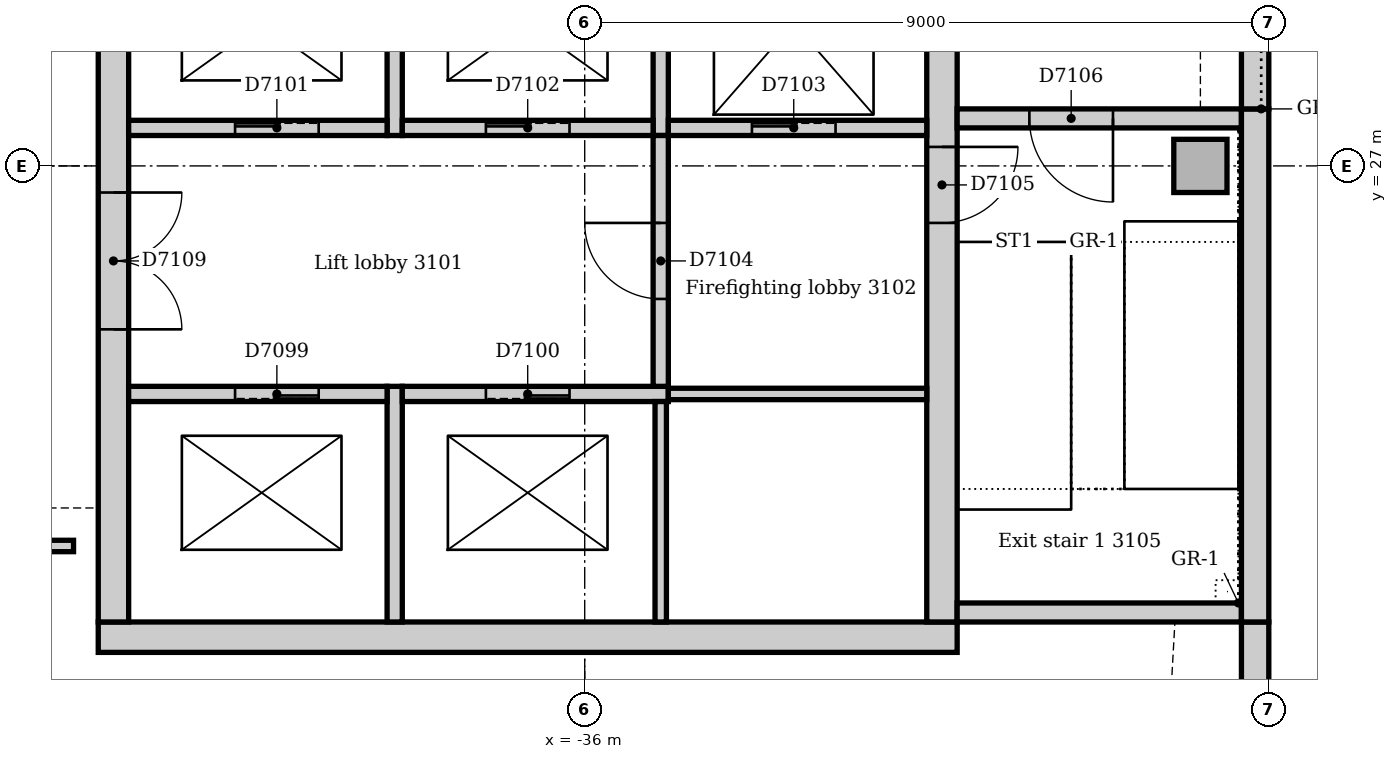
"""IFC4 building model, lengths in metres.
Left out: names, types, materials, properties, quantities, classifications, styles, units other than length and angle.
Written with IfcOpenShell. Run it as: python <this file> out.ifc"""

import sys

from ifc_helpers import new_model, si_unit, direction, frame, frame_2d, origin, origin_2d, place, context, subcontext, project, spatial, rectangle, extrude, element, fill, save


model = new_model("IFC4")
c1 = context("Model", 3, precision=1e-05, world=origin(), true_north=direction((0.0, 1.0)))
c2 = subcontext(c1, "Body", "Model", "MODEL_VIEW")
j1 = project(units=[si_unit("LENGTHUNIT", "METRE"), si_unit("PLANEANGLEUNIT", "RADIAN")], contexts=[c1])
p1 = place(None, origin())
s1 = spatial("IfcSite", under=j1, at=p1, CompositionType="ELEMENT")
p2 = place(p1, origin())
s2 = spatial("IfcBuilding", under=s1, at=p2, CompositionType="ELEMENT")
p3 = place(p2, frame((0.0, 0.0, 132.0)))
s3 = spatial("IfcBuildingStorey", under=s2, at=p3, CompositionType="ELEMENT", Elevation=132.0)
p4 = place(p3, frame((-42.4, 20.8, 0.0), z_axis=(0.0, 0.0, 1.0), x_axis=(1.0, 0.0, 0.0)))
e1 = element("IfcWall", 1, at=p4, inside=s3, PredefinedType="SOLIDWALL", context=c2, shape_type="SweptSolid", body=[
    extrude(rectangle(XDim=11.3, YDim=0.4, at=frame_2d((5.65, 0.0))), origin(), (0.0, 0.0, 1.0), 4.0),
])
p5 = place(p3, frame((-31.3, 21.0, 0.0), z_axis=(0.0, 0.0, 1.0), x_axis=(0.0, 1.0, 0.0)))
e2 = element("IfcWall", 2, at=p5, inside=s3, PredefinedType="SOLIDWALL", context=c2, shape_type="SweptSolid", body=[
    extrude(rectangle(XDim=9.5, YDim=0.4, at=frame_2d((4.75, 0.0))), origin(), (0.0, 0.0, 1.0), 4.0),
])
p6 = place(p5, frame((5.25, 0.0, 0.0)))
e3 = element("IfcOpeningElement", 3, at=p6, cuts=e2, PredefinedType="OPENING", context=c2, shape_type="SweptSolid", body=[
    extrude(rectangle(XDim=1.0, YDim=2.1, at=frame_2d((0.5, 1.05))), frame((0.0, 0.21, 0.0), z_axis=(0.0, -1.0, 0.0), x_axis=(1.0, 0.0, 0.0)), (0.0, 0.0, 1.0), 0.42),
])
p7 = place(p3, frame((-42.2, 30.5, 0.0), z_axis=(0.0, 0.0, 1.0), x_axis=(0.0, -1.0, 0.0)))
e4 = element("IfcWall", 4, at=p7, inside=s3, PredefinedType="SOLIDWALL", context=c2, shape_type="SweptSolid", body=[
    extrude(rectangle(XDim=9.5, YDim=0.4, at=frame_2d((4.75, 0.0))), origin(), (0.0, 0.0, 1.0), 4.0),
])
p8 = place(p7, frame((3.85, 0.0, 0.0)))
e5 = element("IfcOpeningElement", 5, at=p8, cuts=e4, PredefinedType="OPENING", context=c2, shape_type="SweptSolid", body=[
    extrude(rectangle(XDim=1.8, YDim=2.1, at=frame_2d((0.9, 1.05))), frame((0.0, 0.21, 0.0), z_axis=(0.0, -1.0, 0.0), x_axis=(1.0, 0.0, 0.0)), (0.0, 0.0, 1.0), 0.42),
])
p9 = place(p3, frame((-31.1, 21.125, 0.0), z_axis=(0.0, 0.0, 1.0), x_axis=(1.0, 0.0, 0.0)))
e6 = element("IfcWall", 6, at=p9, inside=s3, PredefinedType="SOLIDWALL", context=c2, shape_type="SweptSolid", body=[
    extrude(rectangle(XDim=3.74, YDim=0.25, at=frame_2d((1.87, 0.0))), origin(), (0.0, 0.0, 1.0), 4.0),
])
p10 = place(p3, frame((-27.36, 27.625, 0.0), z_axis=(0.0, 0.0, 1.0), x_axis=(-1.0, 0.0, 0.0)))
e7 = element("IfcWall", 7, at=p10, inside=s3, PredefinedType="SOLIDWALL", context=c2, shape_type="SweptSolid", body=[
    extrude(rectangle(XDim=3.74, YDim=0.25, at=frame_2d((1.87, 0.0))), origin(), (0.0, 0.0, 1.0), 4.0),
])
p11 = place(p10, frame((1.69, 0.0, 0.0)))
e8 = element("IfcOpeningElement", 8, at=p11, cuts=e7, PredefinedType="OPENING", context=c2, shape_type="SweptSolid", body=[
    extrude(rectangle(XDim=1.1, YDim=2.1, at=frame_2d((0.55, 1.05))), frame((0.0, 0.135, 0.0), z_axis=(0.0, -1.0, 0.0), x_axis=(1.0, 0.0, 0.0)), (0.0, 0.0, 1.0), 0.27),
])
p12 = place(p3, frame((-27.9, 27.0, 0.0), z_axis=(0.0, 0.0, 1.0), x_axis=(1.0, 0.0, 0.0)))
e9 = element("IfcColumn", 9, at=p12, inside=s3, PredefinedType="COLUMN", context=c2, shape_type="SweptSolid", body=[
    extrude(rectangle(XDim=0.7, YDim=0.7, at=origin_2d()), origin(), (0.0, 0.0, 1.0), 4.0),
])
p13 = place(p3, frame((-27.18, 17.743, 0.0), z_axis=(0.0, 0.0, 1.0), x_axis=(0.0, 1.0, 0.0)))
e10 = element("IfcWall", 10, at=p13, inside=s3, PredefinedType="STANDARD", context=c2, shape_type="SweptSolid", body=[
    extrude(rectangle(XDim=3.257, YDim=0.36, at=frame_2d((1.629, 0.0))), origin(), (0.0, 0.0, 1.0), 3.85),
])
p14 = place(p3, frame((-27.18, 21.0, 0.0), z_axis=(0.0, 0.0, 1.0), x_axis=(0.0, 1.0, 0.0)))
e11 = element("IfcWall", 11, at=p14, inside=s3, PredefinedType="STANDARD", context=c2, shape_type="SweptSolid", body=[
    extrude(rectangle(XDim=6.75, YDim=0.36, at=frame_2d((3.375, 0.0))), origin(), (0.0, 0.0, 1.0), 3.85),
])
p15 = place(p3, frame((-27.18, 27.75, 0.0), z_axis=(0.0, 0.0, 1.0), x_axis=(0.0, 1.0, 0.0)))
e12 = element("IfcWall", 12, at=p15, inside=s3, PredefinedType="STANDARD", context=c2, shape_type="SweptSolid", body=[
    extrude(rectangle(XDim=7.5, YDim=0.36, at=frame_2d((3.75, 0.0))), origin(), (0.0, 0.0, 1.0), 3.85),
])
p16 = place(p15, frame((2.85, 0.0, 1.2)))
e13 = element("IfcOpeningElement", 13, at=p16, cuts=e12, PredefinedType="OPENING", context=c2, shape_type="SweptSolid", body=[
    extrude(rectangle(XDim=1.8, YDim=1.2, at=frame_2d((0.9, 0.6))), frame((0.0, 0.19, 0.0), z_axis=(0.0, -1.0, 0.0), x_axis=(1.0, 0.0, 0.0)), (0.0, 0.0, 1.0), 0.38),
])
p17 = place(p3, frame((-38.5, 21.0, 0.0), z_axis=(0.0, 0.0, 1.0), x_axis=(0.0, 1.0, 0.0)))
e14 = element("IfcWall", 14, at=p17, inside=s3, PredefinedType="SOLIDWALL", context=c2, shape_type="SweptSolid", body=[
    extrude(rectangle(XDim=3.1, YDim=0.2, at=frame_2d((1.55, 0.0))), origin(), (0.0, 0.0, 1.0), 4.0),
])
p18 = place(p3, frame((-38.6, 24.0, 0.0), z_axis=(0.0, 0.0, 1.0), x_axis=(-1.0, 0.0, 0.0)))
e15 = element("IfcWall", 15, at=p18, inside=s3, PredefinedType="SOLIDWALL", context=c2, shape_type="SweptSolid", body=[
    extrude(rectangle(XDim=3.4, YDim=0.2, at=frame_2d((1.7, 0.0))), origin(), (0.0, 0.0, 1.0), 4.0),
])
p19 = place(p18, frame((0.9, 0.0, 0.0)))
e16 = element("IfcOpeningElement", 16, at=p19, cuts=e15, PredefinedType="OPENING", context=c2, shape_type="SweptSolid", body=[
    extrude(rectangle(XDim=1.1, YDim=2.1, at=frame_2d((0.55, 1.05))), frame((0.0, 0.11, 0.0), z_axis=(0.0, -1.0, 0.0), x_axis=(1.0, 0.0, 0.0)), (0.0, 0.0, 1.0), 0.22),
])
p20 = place(p3, frame((-34.9, 24.0, 0.0), z_axis=(0.0, 0.0, 1.0), x_axis=(-1.0, 0.0, 0.0)))
e17 = element("IfcWall", 17, at=p20, inside=s3, PredefinedType="SOLIDWALL", context=c2, shape_type="SweptSolid", body=[
    extrude(rectangle(XDim=3.5, YDim=0.2, at=frame_2d((1.75, 0.0))), origin(), (0.0, 0.0, 1.0), 4.0),
])
p21 = place(p20, frame((1.3, 0.0, 0.0)))
e18 = element("IfcOpeningElement", 18, at=p21, cuts=e17, PredefinedType="OPENING", context=c2, shape_type="SweptSolid", body=[
    extrude(rectangle(XDim=1.1, YDim=2.1, at=frame_2d((0.55, 1.05))), frame((0.0, 0.11, 0.0), z_axis=(0.0, -1.0, 0.0), x_axis=(1.0, 0.0, 0.0)), (0.0, 0.0, 1.0), 0.22),
])
p22 = place(p3, frame((-38.5, 27.4, 0.0), z_axis=(0.0, 0.0, 1.0), x_axis=(0.0, 1.0, 0.0)))
e19 = element("IfcWall", 19, at=p22, inside=s3, PredefinedType="SOLIDWALL", context=c2, shape_type="SweptSolid", body=[
    extrude(rectangle(XDim=2.85, YDim=0.2, at=frame_2d((1.425, 0.0))), origin(), (0.0, 0.0, 1.0), 4.0),
])
p23 = place(p3, frame((-42.0, 27.5, 0.0), z_axis=(0.0, 0.0, 1.0), x_axis=(1.0, 0.0, 0.0)))
e20 = element("IfcWall", 20, at=p23, inside=s3, PredefinedType="SOLIDWALL", context=c2, shape_type="SweptSolid", body=[
    extrude(rectangle(XDim=3.4, YDim=0.2, at=frame_2d((1.7, 0.0))), origin(), (0.0, 0.0, 1.0), 4.0),
])
p24 = place(p23, frame((1.4, 0.0, 0.0)))
e21 = element("IfcOpeningElement", 21, at=p24, cuts=e20, PredefinedType="OPENING", context=c2, shape_type="SweptSolid", body=[
    extrude(rectangle(XDim=1.1, YDim=2.1, at=frame_2d((0.55, 1.05))), frame((0.0, 0.11, 0.0), z_axis=(0.0, -1.0, 0.0), x_axis=(1.0, 0.0, 0.0)), (0.0, 0.0, 1.0), 0.22),
])
p25 = place(p3, frame((-35.0, 27.4, 0.0), z_axis=(0.0, 0.0, 1.0), x_axis=(0.0, 1.0, 0.0)))
e22 = element("IfcWall", 22, at=p25, inside=s3, PredefinedType="SOLIDWALL", context=c2, shape_type="SweptSolid", body=[
    extrude(rectangle(XDim=2.85, YDim=0.2, at=frame_2d((1.425, 0.0))), origin(), (0.0, 0.0, 1.0), 4.0),
])
p26 = place(p3, frame((-38.4, 27.5, 0.0), z_axis=(0.0, 0.0, 1.0), x_axis=(1.0, 0.0, 0.0)))
e23 = element("IfcWall", 23, at=p26, inside=s3, PredefinedType="SOLIDWALL", context=c2, shape_type="SweptSolid", body=[
    extrude(rectangle(XDim=3.3, YDim=0.2, at=frame_2d((1.65, 0.0))), origin(), (0.0, 0.0, 1.0), 4.0),
])
p27 = place(p26, frame((1.1, 0.0, 0.0)))
e24 = element("IfcOpeningElement", 24, at=p27, cuts=e23, PredefinedType="OPENING", context=c2, shape_type="SweptSolid", body=[
    extrude(rectangle(XDim=1.1, YDim=2.1, at=frame_2d((0.55, 1.05))), frame((0.0, 0.11, 0.0), z_axis=(0.0, -1.0, 0.0), x_axis=(1.0, 0.0, 0.0)), (0.0, 0.0, 1.0), 0.22),
])
p28 = place(p3, frame((-34.9, 27.5, 0.0), z_axis=(0.0, 0.0, 1.0), x_axis=(1.0, 0.0, 0.0)))
e25 = element("IfcWall", 25, at=p28, inside=s3, PredefinedType="SOLIDWALL", context=c2, shape_type="SweptSolid", body=[
    extrude(rectangle(XDim=3.4, YDim=0.2, at=frame_2d((1.7, 0.0))), origin(), (0.0, 0.0, 1.0), 4.0),
])
p29 = place(p28, frame((1.1, 0.0, 0.0)))
e26 = element("IfcOpeningElement", 26, at=p29, cuts=e25, PredefinedType="OPENING", context=c2, shape_type="SweptSolid", body=[
    extrude(rectangle(XDim=1.1, YDim=2.1, at=frame_2d((0.55, 1.05))), frame((0.0, 0.11, 0.0), z_axis=(0.0, -1.0, 0.0), x_axis=(1.0, 0.0, 0.0)), (0.0, 0.0, 1.0), 0.22),
])
p30 = place(p3, frame((-35.0, 24.1, 0.0), z_axis=(0.0, 0.0, 1.0), x_axis=(0.0, 1.0, 0.0)))
e27 = element("IfcWall", 27, at=p30, inside=s3, PredefinedType="SOLIDWALL", context=c2, shape_type="SweptSolid", body=[
    extrude(rectangle(XDim=3.3, YDim=0.2, at=frame_2d((1.65, 0.0))), origin(), (0.0, 0.0, 1.0), 4.0),
])
p31 = place(p30, frame((1.15, 0.0, 0.0)))
e28 = element("IfcOpeningElement", 28, at=p31, cuts=e27, PredefinedType="OPENING", context=c2, shape_type="SweptSolid", body=[
    extrude(rectangle(XDim=1.0, YDim=2.1, at=frame_2d((0.5, 1.05))), frame((0.0, 0.11, 0.0), z_axis=(0.0, -1.0, 0.0), x_axis=(1.0, 0.0, 0.0)), (0.0, 0.0, 1.0), 0.22),
])
p32 = place(p3, frame((-35.0, 21.0, 0.0), z_axis=(0.0, 0.0, 1.0), x_axis=(0.0, 1.0, 0.0)))
e29 = element("IfcWall", 29, at=p32, inside=s3, PredefinedType="SOLIDWALL", context=c2, shape_type="SweptSolid", body=[
    extrude(rectangle(XDim=2.9, YDim=0.15, at=frame_2d((1.45, 0.0))), origin(), (0.0, 0.0, 1.0), 4.0),
])
p33 = place(p3, frame((-31.5, 24.0, 0.0), z_axis=(0.0, 0.0, 1.0), x_axis=(-1.0, 0.0, 0.0)))
e30 = element("IfcWall", 30, at=p33, inside=s3, PredefinedType="SOLIDWALL", context=c2, shape_type="SweptSolid", body=[
    extrude(rectangle(XDim=3.4, YDim=0.15, at=frame_2d((1.7, 0.0))), origin(), (0.0, 0.0, 1.0), 4.0),
])
p34 = place(p3, frame((-59.766, 22.0, 0.0), z_axis=(0.0, 0.0, 1.0), x_axis=(1.0, 0.0, 0.0)))
e31 = element("IfcWall", 31, at=p34, inside=s3, PredefinedType="PARTITIONING", context=c2, shape_type="SweptSolid", body=[
    extrude(rectangle(XDim=17.041, YDim=0.15, at=frame_2d((8.52, 0.0))), origin(), (0.0, 0.0, 1.0), 3.85),
])
p35 = place(p34, frame((15.366, 0.0, 0.0)))
e32 = element("IfcOpeningElement", 32, at=p35, cuts=e31, PredefinedType="OPENING", context=c2, shape_type="SweptSolid", body=[
    extrude(rectangle(XDim=0.9, YDim=2.1, at=frame_2d((0.45, 1.05))), frame((0.0, 0.085, 0.0), z_axis=(0.0, -1.0, 0.0), x_axis=(1.0, 0.0, 0.0)), (0.0, 0.0, 1.0), 0.17),
])
p36 = place(p34, frame((2.5, 0.0, 0.0)))
e33 = element("IfcOpeningElement", 33, at=p36, cuts=e31, PredefinedType="OPENING", context=c2, shape_type="SweptSolid", body=[
    extrude(rectangle(XDim=0.9, YDim=2.1, at=frame_2d((0.45, 1.05))), frame((0.0, 0.085, 0.0), z_axis=(0.0, -1.0, 0.0), x_axis=(1.0, 0.0, 0.0)), (0.0, 0.0, 1.0), 0.17),
])
p37 = place(p34, frame((9.056, 0.0, 0.0)))
e34 = element("IfcOpeningElement", 34, at=p37, cuts=e31, PredefinedType="OPENING", context=c2, shape_type="SweptSolid", body=[
    extrude(rectangle(XDim=1.0, YDim=2.1, at=frame_2d((0.5, 1.05))), frame((0.0, 0.085, 0.0), z_axis=(0.0, -1.0, 0.0), x_axis=(1.0, 0.0, 0.0)), (0.0, 0.0, 1.0), 0.17),
])
p38 = place(p19, origin())
e35 = element("IfcDoor", 35, at=p38, inside=s3, OperationType="SLIDING_TO_LEFT", PredefinedType="DOOR", context=c2, shape_type="SweptSolid", body=[
    extrude(rectangle(XDim=1.1, YDim=2.1, at=frame_2d((0.55, 1.05))), frame((0.0, 0.025, 0.0), z_axis=(0.0, -1.0, 0.0), x_axis=(1.0, 0.0, 0.0)), (0.0, 0.0, 1.0), 0.05),
])
fill(e16, e35)
p39 = place(p21, origin())
e36 = element("IfcDoor", 36, at=p39, inside=s3, OperationType="SLIDING_TO_LEFT", PredefinedType="DOOR", context=c2, shape_type="SweptSolid", body=[
    extrude(rectangle(XDim=1.1, YDim=2.1, at=frame_2d((0.55, 1.05))), frame((0.0, 0.025, 0.0), z_axis=(0.0, -1.0, 0.0), x_axis=(1.0, 0.0, 0.0)), (0.0, 0.0, 1.0), 0.05),
])
fill(e18, e36)
p40 = place(p24, origin())
e37 = element("IfcDoor", 37, at=p40, inside=s3, OperationType="SLIDING_TO_LEFT", PredefinedType="DOOR", context=c2, shape_type="SweptSolid", body=[
    extrude(rectangle(XDim=1.1, YDim=2.1, at=frame_2d((0.55, 1.05))), frame((0.0, 0.025, 0.0), z_axis=(0.0, -1.0, 0.0), x_axis=(1.0, 0.0, 0.0)), (0.0, 0.0, 1.0), 0.05),
])
fill(e21, e37)
p41 = place(p27, origin())
e38 = element("IfcDoor", 38, at=p41, inside=s3, OperationType="SLIDING_TO_LEFT", PredefinedType="DOOR", context=c2, shape_type="SweptSolid", body=[
    extrude(rectangle(XDim=1.1, YDim=2.1, at=frame_2d((0.55, 1.05))), frame((0.0, 0.025, 0.0), z_axis=(0.0, -1.0, 0.0), x_axis=(1.0, 0.0, 0.0)), (0.0, 0.0, 1.0), 0.05),
])
fill(e24, e38)
p42 = place(p29, origin())
e39 = element("IfcDoor", 39, at=p42, inside=s3, OperationType="SLIDING_TO_LEFT", PredefinedType="DOOR", context=c2, shape_type="SweptSolid", body=[
    extrude(rectangle(XDim=1.1, YDim=2.1, at=frame_2d((0.55, 1.05))), frame((0.0, 0.025, 0.0), z_axis=(0.0, -1.0, 0.0), x_axis=(1.0, 0.0, 0.0)), (0.0, 0.0, 1.0), 0.05),
])
fill(e26, e39)
p43 = place(p31, origin())
e40 = element("IfcDoor", 40, at=p43, inside=s3, OperationType="SINGLE_SWING_RIGHT", PredefinedType="DOOR", context=c2, shape_type="SweptSolid", body=[
    extrude(rectangle(XDim=1.0, YDim=2.1, at=frame_2d((0.5, 1.05))), frame((0.0, 0.025, 0.0), z_axis=(0.0, -1.0, 0.0), x_axis=(1.0, 0.0, 0.0)), (0.0, 0.0, 1.0), 0.05),
])
fill(e28, e40)
p44 = place(p6, frame((1.0, 0.0, 0.0), z_axis=(0.0, 0.0, 1.0), x_axis=(-1.0, 0.0, 0.0)))
e41 = element("IfcDoor", 41, at=p44, inside=s3, OperationType="SINGLE_SWING_LEFT", PredefinedType="DOOR", context=c2, shape_type="SweptSolid", body=[
    extrude(rectangle(XDim=1.0, YDim=2.1, at=frame_2d((0.5, 1.05))), frame((0.0, 0.025, 0.0), z_axis=(0.0, -1.0, 0.0), x_axis=(1.0, 0.0, 0.0)), (0.0, 0.0, 1.0), 0.05),
])
fill(e3, e41)
p45 = place(p11, origin())
e42 = element("IfcDoor", 42, at=p45, inside=s3, OperationType="SINGLE_SWING_LEFT", PredefinedType="DOOR", context=c2, shape_type="SweptSolid", body=[
    extrude(rectangle(XDim=1.1, YDim=2.1, at=frame_2d((0.55, 1.05))), frame((0.0, 0.025, 0.0), z_axis=(0.0, -1.0, 0.0), x_axis=(1.0, 0.0, 0.0)), (0.0, 0.0, 1.0), 0.05),
])
fill(e8, e42)
p46 = place(p8, origin())
e43 = element("IfcDoor", 43, at=p46, inside=s3, OperationType="DOUBLE_DOOR_SINGLE_SWING", PredefinedType="DOOR", context=c2, shape_type="SweptSolid", body=[
    extrude(rectangle(XDim=1.8, YDim=2.1, at=frame_2d((0.9, 1.05))), frame((0.0, 0.025, 0.0), z_axis=(0.0, -1.0, 0.0), x_axis=(1.0, 0.0, 0.0)), (0.0, 0.0, 1.0), 0.05),
])
fill(e5, e43)
save(model, sys.argv[1])
